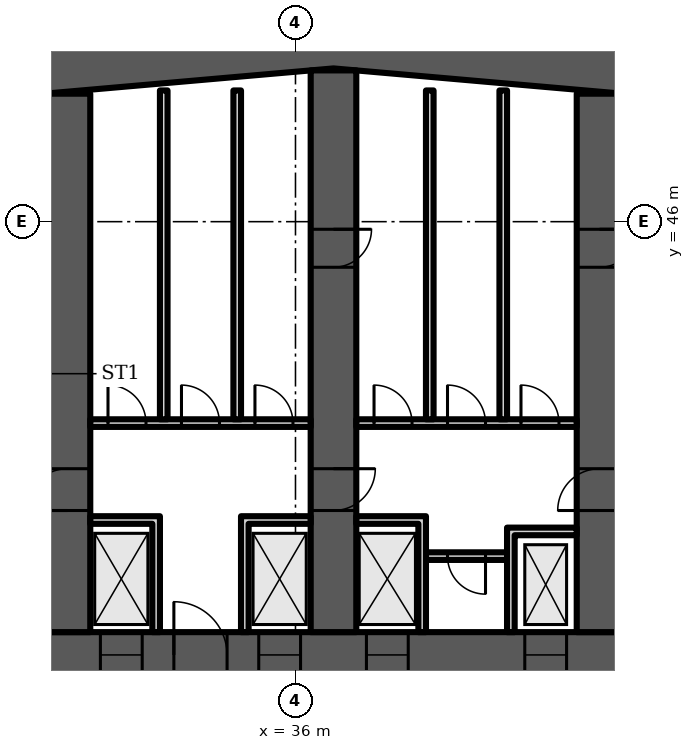
"""IFC4 building model, lengths in metres.
Left out: names, types, materials, properties, quantities, classifications, styles, units other than length and angle.
Written with IfcOpenShell. Run it as: python <this file> out.ifc"""

import sys

from ifc_helpers import new_model, si_unit, direction, frame, frame_2d, origin, place, context, subcontext, project, spatial, polyline, rectangle, outline, extrude, element, fill, save


model = new_model("IFC4")
c1 = context("Model", 3, precision=1e-05, world=origin(), true_north=direction((0.0, 1.0)))
c2 = subcontext(c1, "Body", "Model", "MODEL_VIEW")
j1 = project(units=[si_unit("LENGTHUNIT", "METRE"), si_unit("PLANEANGLEUNIT", "RADIAN")], contexts=[c1])
p1 = place(None, origin())
s1 = spatial("IfcSite", under=j1, at=p1, CompositionType="ELEMENT")
p2 = place(p1, origin())
s2 = spatial("IfcBuilding", under=s1, at=p2, CompositionType="ELEMENT")
p3 = place(p2, frame((0.0, 0.0, 52.3)))
s3 = spatial("IfcBuildingStorey", under=s2, at=p3, CompositionType="ELEMENT", Elevation=52.3)
p4 = place(p3, frame((0.0, 0.0, -0.0)))
e1 = element("IfcWall", 1, at=p4, inside=s3, PredefinedType="SHEAR", context=c2, shape_type="SweptSolid", body=[
    extrude(outline(polyline([(9.0, 47.583), (37.0, 50.032), (65.0, 47.583), (65.0, 48.787), (37.0, 51.237), (9.0, 48.787), (9.0, 47.583)])), origin(), (0.0, 0.0, 1.0), 3.6),
])
p5 = place(p3, frame((9.0, 34.6, 0.0), z_axis=(0.0, 0.0, 1.0), x_axis=(1.0, 0.0, 0.0)))
e2 = element("IfcWall", 2, at=p5, inside=s3, PredefinedType="SHEAR", context=c2, shape_type="SweptSolid", body=[
    extrude(rectangle(XDim=56.0, YDim=1.2, at=frame_2d((28.0, 0.0))), origin(), (0.0, 0.0, 1.0), 3.6),
])
p6 = place(p5, frame((2.0, 0.0, 0.0)))
e3 = element("IfcOpeningElement", 3, at=p6, cuts=e2, PredefinedType="OPENING", context=c2, shape_type="SweptSolid", body=[
    extrude(rectangle(XDim=1.0, YDim=2.1, at=frame_2d((0.5, 1.05))), frame((0.0, 0.61, 0.0), z_axis=(0.0, -1.0, 0.0), x_axis=(1.0, 0.0, 0.0)), (0.0, 0.0, 1.0), 1.22),
])
p7 = place(p5, frame((4.6, 0.0, 0.0)))
e4 = element("IfcOpeningElement", 4, at=p7, cuts=e2, PredefinedType="OPENING", context=c2, shape_type="SweptSolid", body=[
    extrude(rectangle(XDim=1.0, YDim=2.1, at=frame_2d((0.5, 1.05))), frame((0.0, 0.61, 0.0), z_axis=(0.0, -1.0, 0.0), x_axis=(1.0, 0.0, 0.0)), (0.0, 0.0, 1.0), 1.22),
])
p8 = place(p5, frame((7.867, 0.0, 0.0)))
e5 = element("IfcOpeningElement", 5, at=p8, cuts=e2, PredefinedType="OPENING", context=c2, shape_type="SweptSolid", body=[
    extrude(rectangle(XDim=1.1, YDim=2.1, at=frame_2d((0.55, 1.05))), frame((0.0, 0.61, 0.0), z_axis=(0.0, -1.0, 0.0), x_axis=(1.0, 0.0, 0.0)), (0.0, 0.0, 1.0), 1.22),
])
p9 = place(p5, frame((12.033, 0.0, 0.0)))
e6 = element("IfcOpeningElement", 6, at=p9, cuts=e2, PredefinedType="OPENING", context=c2, shape_type="SweptSolid", body=[
    extrude(rectangle(XDim=1.1, YDim=2.1, at=frame_2d((0.55, 1.05))), frame((0.0, 0.61, 0.0), z_axis=(0.0, -1.0, 0.0), x_axis=(1.0, 0.0, 0.0)), (0.0, 0.0, 1.0), 1.22),
])
p10 = place(p5, frame((9.8, 0.0, 0.0)))
e7 = element("IfcOpeningElement", 7, at=p10, cuts=e2, PredefinedType="OPENING", context=c2, shape_type="SweptSolid", body=[
    extrude(rectangle(XDim=1.4, YDim=2.1, at=frame_2d((0.7, 1.05))), frame((0.0, 0.61, 0.0), z_axis=(0.0, -1.0, 0.0), x_axis=(1.0, 0.0, 0.0)), (0.0, 0.0, 1.0), 1.22),
])
p11 = place(p5, frame((14.65, 0.0, 0.0)))
e8 = element("IfcOpeningElement", 8, at=p11, cuts=e2, PredefinedType="OPENING", context=c2, shape_type="SweptSolid", body=[
    extrude(rectangle(XDim=1.2, YDim=2.1, at=frame_2d((0.6, 1.05))), frame((0.0, 0.61, 0.0), z_axis=(0.0, -1.0, 0.0), x_axis=(1.0, 0.0, 0.0)), (0.0, 0.0, 1.0), 1.22),
])
p12 = place(p5, frame((21.867, 0.0, 0.0)))
e9 = element("IfcOpeningElement", 9, at=p12, cuts=e2, PredefinedType="OPENING", context=c2, shape_type="SweptSolid", body=[
    extrude(rectangle(XDim=1.1, YDim=2.1, at=frame_2d((0.55, 1.05))), frame((0.0, 0.61, 0.0), z_axis=(0.0, -1.0, 0.0), x_axis=(1.0, 0.0, 0.0)), (0.0, 0.0, 1.0), 1.22),
])
p13 = place(p5, frame((26.033, 0.0, 0.0)))
e10 = element("IfcOpeningElement", 10, at=p13, cuts=e2, PredefinedType="OPENING", context=c2, shape_type="SweptSolid", body=[
    extrude(rectangle(XDim=1.1, YDim=2.1, at=frame_2d((0.55, 1.05))), frame((0.0, 0.61, 0.0), z_axis=(0.0, -1.0, 0.0), x_axis=(1.0, 0.0, 0.0)), (0.0, 0.0, 1.0), 1.22),
])
p14 = place(p5, frame((23.8, 0.0, 0.0)))
e11 = element("IfcOpeningElement", 11, at=p14, cuts=e2, PredefinedType="OPENING", context=c2, shape_type="SweptSolid", body=[
    extrude(rectangle(XDim=1.4, YDim=2.1, at=frame_2d((0.7, 1.05))), frame((0.0, 0.61, 0.0), z_axis=(0.0, -1.0, 0.0), x_axis=(1.0, 0.0, 0.0)), (0.0, 0.0, 1.0), 1.22),
])
p15 = place(p5, frame((28.867, 0.0, 0.0)))
e12 = element("IfcOpeningElement", 12, at=p15, cuts=e2, PredefinedType="OPENING", context=c2, shape_type="SweptSolid", body=[
    extrude(rectangle(XDim=1.1, YDim=2.1, at=frame_2d((0.55, 1.05))), frame((0.0, 0.61, 0.0), z_axis=(0.0, -1.0, 0.0), x_axis=(1.0, 0.0, 0.0)), (0.0, 0.0, 1.0), 1.22),
])
p16 = place(p5, frame((33.033, 0.0, 0.0)))
e13 = element("IfcOpeningElement", 13, at=p16, cuts=e2, PredefinedType="OPENING", context=c2, shape_type="SweptSolid", body=[
    extrude(rectangle(XDim=1.1, YDim=2.1, at=frame_2d((0.55, 1.05))), frame((0.0, 0.61, 0.0), z_axis=(0.0, -1.0, 0.0), x_axis=(1.0, 0.0, 0.0)), (0.0, 0.0, 1.0), 1.22),
])
p17 = place(p5, frame((40.15, 0.0, 0.0)))
e14 = element("IfcOpeningElement", 14, at=p17, cuts=e2, PredefinedType="OPENING", context=c2, shape_type="SweptSolid", body=[
    extrude(rectangle(XDim=1.2, YDim=2.1, at=frame_2d((0.6, 1.05))), frame((0.0, 0.61, 0.0), z_axis=(0.0, -1.0, 0.0), x_axis=(1.0, 0.0, 0.0)), (0.0, 0.0, 1.0), 1.22),
])
p18 = place(p5, frame((44.8, 0.0, 0.0)))
e15 = element("IfcOpeningElement", 15, at=p18, cuts=e2, PredefinedType="OPENING", context=c2, shape_type="SweptSolid", body=[
    extrude(rectangle(XDim=1.4, YDim=2.1, at=frame_2d((0.7, 1.05))), frame((0.0, 0.61, 0.0), z_axis=(0.0, -1.0, 0.0), x_axis=(1.0, 0.0, 0.0)), (0.0, 0.0, 1.0), 1.22),
])
p19 = place(p5, frame((49.867, 0.0, 0.0)))
e16 = element("IfcOpeningElement", 16, at=p19, cuts=e2, PredefinedType="OPENING", context=c2, shape_type="SweptSolid", body=[
    extrude(rectangle(XDim=1.1, YDim=2.1, at=frame_2d((0.55, 1.05))), frame((0.0, 0.61, 0.0), z_axis=(0.0, -1.0, 0.0), x_axis=(1.0, 0.0, 0.0)), (0.0, 0.0, 1.0), 1.22),
])
p20 = place(p5, frame((53.5, 0.0, 0.0)))
e17 = element("IfcOpeningElement", 17, at=p20, cuts=e2, PredefinedType="OPENING", context=c2, shape_type="SweptSolid", body=[
    extrude(rectangle(XDim=1.1, YDim=2.1, at=frame_2d((0.55, 1.05))), frame((0.0, 0.61, 0.0), z_axis=(0.0, -1.0, 0.0), x_axis=(1.0, 0.0, 0.0)), (0.0, 0.0, 1.0), 1.22),
])
p21 = place(p5, frame((51.567, 0.0, 0.0)))
e18 = element("IfcOpeningElement", 18, at=p21, cuts=e2, PredefinedType="OPENING", context=c2, shape_type="SweptSolid", body=[
    extrude(rectangle(XDim=1.4, YDim=2.1, at=frame_2d((0.7, 1.05))), frame((0.0, 0.61, 0.0), z_axis=(0.0, -1.0, 0.0), x_axis=(1.0, 0.0, 0.0)), (0.0, 0.0, 1.0), 1.22),
])
p22 = place(p3, frame((30.0, 35.2, 0.0), z_axis=(0.0, 0.0, 1.0), x_axis=(0.0, 1.0, 0.0)))
e19 = element("IfcWall", 19, at=p22, inside=s3, PredefinedType="SHEAR", context=c2, shape_type="SweptSolid", body=[
    extrude(rectangle(XDim=14.168, YDim=1.2, at=frame_2d((7.084, 0.0))), origin(), (0.0, 0.0, 1.0), 3.6),
])
p23 = place(p22, frame((3.2, 0.0, 0.0)))
e20 = element("IfcOpeningElement", 20, at=p23, cuts=e19, PredefinedType="OPENING", context=c2, shape_type="SweptSolid", body=[
    extrude(rectangle(XDim=1.1, YDim=2.1, at=frame_2d((0.55, 1.05))), frame((0.0, 0.61, 0.0), z_axis=(0.0, -1.0, 0.0), x_axis=(1.0, 0.0, 0.0)), (0.0, 0.0, 1.0), 1.22),
])
p24 = place(p3, frame((37.0, 35.2, 0.0), z_axis=(0.0, 0.0, 1.0), x_axis=(0.0, 1.0, 0.0)))
e21 = element("IfcWall", 21, at=p24, inside=s3, PredefinedType="SHEAR", context=c2, shape_type="SweptSolid", body=[
    extrude(rectangle(XDim=14.78, YDim=1.2, at=frame_2d((7.39, 0.0))), origin(), (0.0, 0.0, 1.0), 3.6),
])
p25 = place(p24, frame((3.2, 0.0, 0.0)))
e22 = element("IfcOpeningElement", 22, at=p25, cuts=e21, PredefinedType="OPENING", context=c2, shape_type="SweptSolid", body=[
    extrude(rectangle(XDim=1.1, YDim=2.1, at=frame_2d((0.55, 1.05))), frame((0.0, 0.61, 0.0), z_axis=(0.0, -1.0, 0.0), x_axis=(1.0, 0.0, 0.0)), (0.0, 0.0, 1.0), 1.22),
])
p26 = place(p24, frame((9.6, 0.0, 0.0)))
e23 = element("IfcOpeningElement", 23, at=p26, cuts=e21, PredefinedType="OPENING", context=c2, shape_type="SweptSolid", body=[
    extrude(rectangle(XDim=1.0, YDim=2.1, at=frame_2d((0.5, 1.05))), frame((0.0, 0.61, 0.0), z_axis=(0.0, -1.0, 0.0), x_axis=(1.0, 0.0, 0.0)), (0.0, 0.0, 1.0), 1.22),
])
p27 = place(p3, frame((44.0, 35.2, 0.0), z_axis=(0.0, 0.0, 1.0), x_axis=(0.0, 1.0, 0.0)))
e24 = element("IfcWall", 24, at=p27, inside=s3, PredefinedType="SHEAR", context=c2, shape_type="SweptSolid", body=[
    extrude(rectangle(XDim=14.168, YDim=1.2, at=frame_2d((7.084, 0.0))), origin(), (0.0, 0.0, 1.0), 3.6),
])
p28 = place(p27, frame((3.2, 0.0, 0.0)))
e25 = element("IfcOpeningElement", 25, at=p28, cuts=e24, PredefinedType="OPENING", context=c2, shape_type="SweptSolid", body=[
    extrude(rectangle(XDim=1.1, YDim=2.1, at=frame_2d((0.55, 1.05))), frame((0.0, 0.61, 0.0), z_axis=(0.0, -1.0, 0.0), x_axis=(1.0, 0.0, 0.0)), (0.0, 0.0, 1.0), 1.22),
])
p29 = place(p27, frame((9.6, 0.0, 0.0)))
e26 = element("IfcOpeningElement", 26, at=p29, cuts=e24, PredefinedType="OPENING", context=c2, shape_type="SweptSolid", body=[
    extrude(rectangle(XDim=1.0, YDim=2.1, at=frame_2d((0.5, 1.05))), frame((0.0, 0.61, 0.0), z_axis=(0.0, -1.0, 0.0), x_axis=(1.0, 0.0, 0.0)), (0.0, 0.0, 1.0), 1.22),
])
p30 = place(p3, frame((30.6, 40.7, 0.0), z_axis=(0.0, 0.0, 1.0), x_axis=(1.0, 0.0, 0.0)))
e27 = element("IfcWall", 27, at=p30, inside=s3, PredefinedType="PARTITIONING", context=c2, shape_type="SweptSolid", body=[
    extrude(rectangle(XDim=5.8, YDim=0.2, at=frame_2d((2.9, 0.0))), origin(), (0.0, 0.0, 1.0), 3.2),
])
p31 = place(p30, frame((0.467, 0.0, 0.0)))
e28 = element("IfcOpeningElement", 28, at=p31, cuts=e27, PredefinedType="OPENING", context=c2, shape_type="SweptSolid", body=[
    extrude(rectangle(XDim=1.0, YDim=2.1, at=frame_2d((0.5, 1.05))), frame((0.0, 0.11, 0.0), z_axis=(0.0, -1.0, 0.0), x_axis=(1.0, 0.0, 0.0)), (0.0, 0.0, 1.0), 0.22),
])
p32 = place(p30, frame((2.4, 0.0, 0.0)))
e29 = element("IfcOpeningElement", 29, at=p32, cuts=e27, PredefinedType="OPENING", context=c2, shape_type="SweptSolid", body=[
    extrude(rectangle(XDim=1.0, YDim=2.1, at=frame_2d((0.5, 1.05))), frame((0.0, 0.11, 0.0), z_axis=(0.0, -1.0, 0.0), x_axis=(1.0, 0.0, 0.0)), (0.0, 0.0, 1.0), 0.22),
])
p33 = place(p30, frame((4.333, 0.0, 0.0)))
e30 = element("IfcOpeningElement", 30, at=p33, cuts=e27, PredefinedType="OPENING", context=c2, shape_type="SweptSolid", body=[
    extrude(rectangle(XDim=1.0, YDim=2.1, at=frame_2d((0.5, 1.05))), frame((0.0, 0.11, 0.0), z_axis=(0.0, -1.0, 0.0), x_axis=(1.0, 0.0, 0.0)), (0.0, 0.0, 1.0), 0.22),
])
p34 = place(p3, frame((0.0, 0.0, -0.0)))
e31 = element("IfcWall", 31, at=p34, inside=s3, PredefinedType="PARTITIONING", context=c2, shape_type="SweptSolid", body=[
    extrude(outline(polyline([(32.233, 38.05), (30.6, 38.05), (30.6, 38.25), (32.233, 38.25), (32.433, 38.25), (32.433, 35.2), (32.233, 35.2), (32.233, 38.05)])), origin(), (0.0, 0.0, 1.0), 3.2),
])
p35 = place(p3, frame((0.0, 0.0, -0.0)))
e32 = element("IfcWall", 32, at=p35, inside=s3, PredefinedType="PARTITIONING", context=c2, shape_type="SweptSolid", body=[
    extrude(outline(polyline([(34.567, 38.25), (34.767, 38.25), (36.4, 38.25), (36.4, 38.05), (34.767, 38.05), (34.767, 35.2), (34.567, 35.2), (34.567, 38.25)])), origin(), (0.0, 0.0, 1.0), 3.2),
])
for number, where, z_axis, x_axis in (
    (33, (32.533, 40.8, 0.0), (0.0, 0.0, 1.0), (0.0, 1.0, 0.0)),
    (34, (34.467, 40.8, 0.0), (0.0, 0.0, 1.0), (0.0, 1.0, 0.0)),
):
    element("IfcWall", number, at=place(p3, frame(where, z_axis=z_axis, x_axis=x_axis)), inside=s3, PredefinedType="PARTITIONING", context=c2, shape_type="SweptSolid", body=[
        extrude(rectangle(XDim=8.653, YDim=0.2, at=frame_2d((4.326, 0.0))), origin(), (0.0, 0.0, 1.0), 3.2),
    ])
p36 = place(p3, frame((39.433, 37.2, 0.0), z_axis=(0.0, 0.0, 1.0), x_axis=(1.0, 0.0, 0.0)))
e35 = element("IfcWall", 35, at=p36, inside=s3, PredefinedType="PARTITIONING", context=c2, shape_type="SweptSolid", body=[
    extrude(rectangle(XDim=2.133, YDim=0.2, at=frame_2d((1.067, 0.0))), origin(), (0.0, 0.0, 1.0), 3.2),
])
p37 = place(p36, frame((0.567, 0.0, 0.0)))
e36 = element("IfcOpeningElement", 36, at=p37, cuts=e35, PredefinedType="OPENING", context=c2, shape_type="SweptSolid", body=[
    extrude(rectangle(XDim=1.0, YDim=2.1, at=frame_2d((0.5, 1.05))), frame((0.0, 0.11, 0.0), z_axis=(0.0, -1.0, 0.0), x_axis=(1.0, 0.0, 0.0)), (0.0, 0.0, 1.0), 0.22),
])
p38 = place(p3, frame((37.6, 40.7, 0.0), z_axis=(0.0, 0.0, 1.0), x_axis=(1.0, 0.0, 0.0)))
e37 = element("IfcWall", 37, at=p38, inside=s3, PredefinedType="PARTITIONING", context=c2, shape_type="SweptSolid", body=[
    extrude(rectangle(XDim=5.8, YDim=0.2, at=frame_2d((2.9, 0.0))), origin(), (0.0, 0.0, 1.0), 3.2),
])
p39 = place(p38, frame((0.467, 0.0, 0.0)))
e38 = element("IfcOpeningElement", 38, at=p39, cuts=e37, PredefinedType="OPENING", context=c2, shape_type="SweptSolid", body=[
    extrude(rectangle(XDim=1.0, YDim=2.1, at=frame_2d((0.5, 1.05))), frame((0.0, 0.11, 0.0), z_axis=(0.0, -1.0, 0.0), x_axis=(1.0, 0.0, 0.0)), (0.0, 0.0, 1.0), 0.22),
])
p40 = place(p38, frame((2.4, 0.0, 0.0)))
e39 = element("IfcOpeningElement", 39, at=p40, cuts=e37, PredefinedType="OPENING", context=c2, shape_type="SweptSolid", body=[
    extrude(rectangle(XDim=1.0, YDim=2.1, at=frame_2d((0.5, 1.05))), frame((0.0, 0.11, 0.0), z_axis=(0.0, -1.0, 0.0), x_axis=(1.0, 0.0, 0.0)), (0.0, 0.0, 1.0), 0.22),
])
p41 = place(p38, frame((4.333, 0.0, 0.0)))
e40 = element("IfcOpeningElement", 40, at=p41, cuts=e37, PredefinedType="OPENING", context=c2, shape_type="SweptSolid", body=[
    extrude(rectangle(XDim=1.0, YDim=2.1, at=frame_2d((0.5, 1.05))), frame((0.0, 0.11, 0.0), z_axis=(0.0, -1.0, 0.0), x_axis=(1.0, 0.0, 0.0)), (0.0, 0.0, 1.0), 0.22),
])
p42 = place(p3, frame((0.0, 0.0, -0.0)))
e41 = element("IfcWall", 41, at=p42, inside=s3, PredefinedType="PARTITIONING", context=c2, shape_type="SweptSolid", body=[
    extrude(outline(polyline([(41.567, 37.95), (41.767, 37.95), (43.4, 37.95), (43.4, 37.75), (41.767, 37.75), (41.767, 35.2), (41.567, 35.2), (41.567, 37.95)])), origin(), (0.0, 0.0, 1.0), 3.2),
])
p43 = place(p3, frame((0.0, 0.0, -0.0)))
e42 = element("IfcWall", 42, at=p43, inside=s3, PredefinedType="PARTITIONING", context=c2, shape_type="SweptSolid", body=[
    extrude(outline(polyline([(39.233, 38.05), (37.6, 38.05), (37.6, 38.25), (39.233, 38.25), (39.433, 38.25), (39.433, 35.2), (39.233, 35.2), (39.233, 38.05)])), origin(), (0.0, 0.0, 1.0), 3.2),
])
for number, where, z_axis, x_axis in (
    (43, (39.533, 40.8, 0.0), (0.0, 0.0, 1.0), (0.0, 1.0, 0.0)),
    (44, (41.467, 40.8, 0.0), (0.0, 0.0, 1.0), (0.0, 1.0, 0.0)),
):
    element("IfcWall", number, at=place(p3, frame(where, z_axis=z_axis, x_axis=x_axis)), inside=s3, PredefinedType="PARTITIONING", context=c2, shape_type="SweptSolid", body=[
        extrude(rectangle(XDim=8.653, YDim=0.2, at=frame_2d((4.326, 0.0))), origin(), (0.0, 0.0, 1.0), 3.2),
    ])
p44 = place(p12, origin())
e45 = element("IfcDoor", 45, at=p44, inside=s3, OperationType="DOUBLE_DOOR_SLIDING", PredefinedType="DOOR", context=c2, shape_type="SweptSolid", body=[
    extrude(rectangle(XDim=1.1, YDim=2.1, at=frame_2d((0.55, 1.05))), frame((0.0, 0.025, 0.0), z_axis=(0.0, -1.0, 0.0), x_axis=(1.0, 0.0, 0.0)), (0.0, 0.0, 1.0), 0.05),
])
fill(e9, e45)
p45 = place(p13, origin())
e46 = element("IfcDoor", 46, at=p45, inside=s3, OperationType="DOUBLE_DOOR_SLIDING", PredefinedType="DOOR", context=c2, shape_type="SweptSolid", body=[
    extrude(rectangle(XDim=1.1, YDim=2.1, at=frame_2d((0.55, 1.05))), frame((0.0, 0.025, 0.0), z_axis=(0.0, -1.0, 0.0), x_axis=(1.0, 0.0, 0.0)), (0.0, 0.0, 1.0), 0.05),
])
fill(e10, e46)
p46 = place(p14, origin())
e47 = element("IfcDoor", 47, at=p46, inside=s3, OperationType="DOUBLE_DOOR_SINGLE_SWING", PredefinedType="DOOR", context=c2, shape_type="SweptSolid", body=[
    extrude(rectangle(XDim=1.4, YDim=2.1, at=frame_2d((0.7, 1.05))), frame((0.0, 0.025, 0.0), z_axis=(0.0, -1.0, 0.0), x_axis=(1.0, 0.0, 0.0)), (0.0, 0.0, 1.0), 0.05),
])
fill(e11, e47)
p47 = place(p31, origin())
e48 = element("IfcDoor", 48, at=p47, inside=s3, OperationType="SINGLE_SWING_LEFT", PredefinedType="DOOR", context=c2, shape_type="SweptSolid", body=[
    extrude(rectangle(XDim=1.0, YDim=2.1, at=frame_2d((0.5, 1.05))), frame((0.0, 0.025, 0.0), z_axis=(0.0, -1.0, 0.0), x_axis=(1.0, 0.0, 0.0)), (0.0, 0.0, 1.0), 0.05),
])
fill(e28, e48)
p48 = place(p32, origin())
e49 = element("IfcDoor", 49, at=p48, inside=s3, OperationType="SINGLE_SWING_LEFT", PredefinedType="DOOR", context=c2, shape_type="SweptSolid", body=[
    extrude(rectangle(XDim=1.0, YDim=2.1, at=frame_2d((0.5, 1.05))), frame((0.0, 0.025, 0.0), z_axis=(0.0, -1.0, 0.0), x_axis=(1.0, 0.0, 0.0)), (0.0, 0.0, 1.0), 0.05),
])
fill(e29, e49)
p49 = place(p33, origin())
e50 = element("IfcDoor", 50, at=p49, inside=s3, OperationType="SINGLE_SWING_LEFT", PredefinedType="DOOR", context=c2, shape_type="SweptSolid", body=[
    extrude(rectangle(XDim=1.0, YDim=2.1, at=frame_2d((0.5, 1.05))), frame((0.0, 0.025, 0.0), z_axis=(0.0, -1.0, 0.0), x_axis=(1.0, 0.0, 0.0)), (0.0, 0.0, 1.0), 0.05),
])
fill(e30, e50)
p50 = place(p37, origin())
e51 = element("IfcDoor", 51, at=p50, inside=s3, OperationType="SINGLE_SWING_RIGHT", PredefinedType="DOOR", context=c2, shape_type="SweptSolid", body=[
    extrude(rectangle(XDim=1.0, YDim=2.1, at=frame_2d((0.5, 1.05))), frame((0.0, 0.025, 0.0), z_axis=(0.0, -1.0, 0.0), x_axis=(1.0, 0.0, 0.0)), (0.0, 0.0, 1.0), 0.05),
])
fill(e36, e51)
p51 = place(p15, origin())
e52 = element("IfcDoor", 52, at=p51, inside=s3, OperationType="DOUBLE_DOOR_SLIDING", PredefinedType="DOOR", context=c2, shape_type="SweptSolid", body=[
    extrude(rectangle(XDim=1.1, YDim=2.1, at=frame_2d((0.55, 1.05))), frame((0.0, 0.025, 0.0), z_axis=(0.0, -1.0, 0.0), x_axis=(1.0, 0.0, 0.0)), (0.0, 0.0, 1.0), 0.05),
])
fill(e12, e52)
p52 = place(p16, origin())
e53 = element("IfcDoor", 53, at=p52, inside=s3, OperationType="DOUBLE_DOOR_SLIDING", PredefinedType="DOOR", context=c2, shape_type="SweptSolid", body=[
    extrude(rectangle(XDim=1.1, YDim=2.1, at=frame_2d((0.55, 1.05))), frame((0.0, 0.025, 0.0), z_axis=(0.0, -1.0, 0.0), x_axis=(1.0, 0.0, 0.0)), (0.0, 0.0, 1.0), 0.05),
])
fill(e13, e53)
p53 = place(p39, origin())
e54 = element("IfcDoor", 54, at=p53, inside=s3, OperationType="SINGLE_SWING_LEFT", PredefinedType="DOOR", context=c2, shape_type="SweptSolid", body=[
    extrude(rectangle(XDim=1.0, YDim=2.1, at=frame_2d((0.5, 1.05))), frame((0.0, 0.025, 0.0), z_axis=(0.0, -1.0, 0.0), x_axis=(1.0, 0.0, 0.0)), (0.0, 0.0, 1.0), 0.05),
])
fill(e38, e54)
p54 = place(p40, origin())
e55 = element("IfcDoor", 55, at=p54, inside=s3, OperationType="SINGLE_SWING_LEFT", PredefinedType="DOOR", context=c2, shape_type="SweptSolid", body=[
    extrude(rectangle(XDim=1.0, YDim=2.1, at=frame_2d((0.5, 1.05))), frame((0.0, 0.025, 0.0), z_axis=(0.0, -1.0, 0.0), x_axis=(1.0, 0.0, 0.0)), (0.0, 0.0, 1.0), 0.05),
])
fill(e39, e55)
p55 = place(p41, origin())
e56 = element("IfcDoor", 56, at=p55, inside=s3, OperationType="SINGLE_SWING_LEFT", PredefinedType="DOOR", context=c2, shape_type="SweptSolid", body=[
    extrude(rectangle(XDim=1.0, YDim=2.1, at=frame_2d((0.5, 1.05))), frame((0.0, 0.025, 0.0), z_axis=(0.0, -1.0, 0.0), x_axis=(1.0, 0.0, 0.0)), (0.0, 0.0, 1.0), 0.05),
])
fill(e40, e56)
p56 = place(p23, origin())
e57 = element("IfcDoor", 57, at=p56, inside=s3, OperationType="SINGLE_SWING_LEFT", PredefinedType="DOOR", context=c2, shape_type="SweptSolid", body=[
    extrude(rectangle(XDim=1.1, YDim=2.1, at=frame_2d((0.55, 1.05))), frame((0.0, 0.025, 0.0), z_axis=(0.0, -1.0, 0.0), x_axis=(1.0, 0.0, 0.0)), (0.0, 0.0, 1.0), 0.05),
])
fill(e20, e57)
p57 = place(p25, origin())
e58 = element("IfcDoor", 58, at=p57, inside=s3, OperationType="SINGLE_SWING_RIGHT", PredefinedType="DOOR", context=c2, shape_type="SweptSolid", body=[
    extrude(rectangle(XDim=1.1, YDim=2.1, at=frame_2d((0.55, 1.05))), frame((0.0, 0.025, 0.0), z_axis=(0.0, -1.0, 0.0), x_axis=(1.0, 0.0, 0.0)), (0.0, 0.0, 1.0), 0.05),
])
fill(e22, e58)
p58 = place(p26, origin())
e59 = element("IfcDoor", 59, at=p58, inside=s3, OperationType="SINGLE_SWING_RIGHT", PredefinedType="DOOR", context=c2, shape_type="SweptSolid", body=[
    extrude(rectangle(XDim=1.0, YDim=2.1, at=frame_2d((0.5, 1.05))), frame((0.0, 0.6, 0.0), z_axis=(0.0, -1.0, 0.0), x_axis=(1.0, 0.0, 0.0)), (0.0, 0.0, 1.0), 1.199),
])
fill(e23, e59)
p59 = place(p28, origin())
e60 = element("IfcDoor", 60, at=p59, inside=s3, OperationType="SINGLE_SWING_LEFT", PredefinedType="DOOR", context=c2, shape_type="SweptSolid", body=[
    extrude(rectangle(XDim=1.1, YDim=2.1, at=frame_2d((0.55, 1.05))), frame((0.0, 0.025, 0.0), z_axis=(0.0, -1.0, 0.0), x_axis=(1.0, 0.0, 0.0)), (0.0, 0.0, 1.0), 0.05),
])
fill(e25, e60)
p60 = place(p29, origin())
e61 = element("IfcDoor", 61, at=p60, inside=s3, OperationType="SINGLE_SWING_RIGHT", PredefinedType="DOOR", context=c2, shape_type="SweptSolid", body=[
    extrude(rectangle(XDim=1.0, YDim=2.1, at=frame_2d((0.5, 1.05))), frame((0.0, 0.6, 0.0), z_axis=(0.0, -1.0, 0.0), x_axis=(1.0, 0.0, 0.0)), (0.0, 0.0, 1.0), 1.199),
])
fill(e26, e61)
save(model, sys.argv[1])
